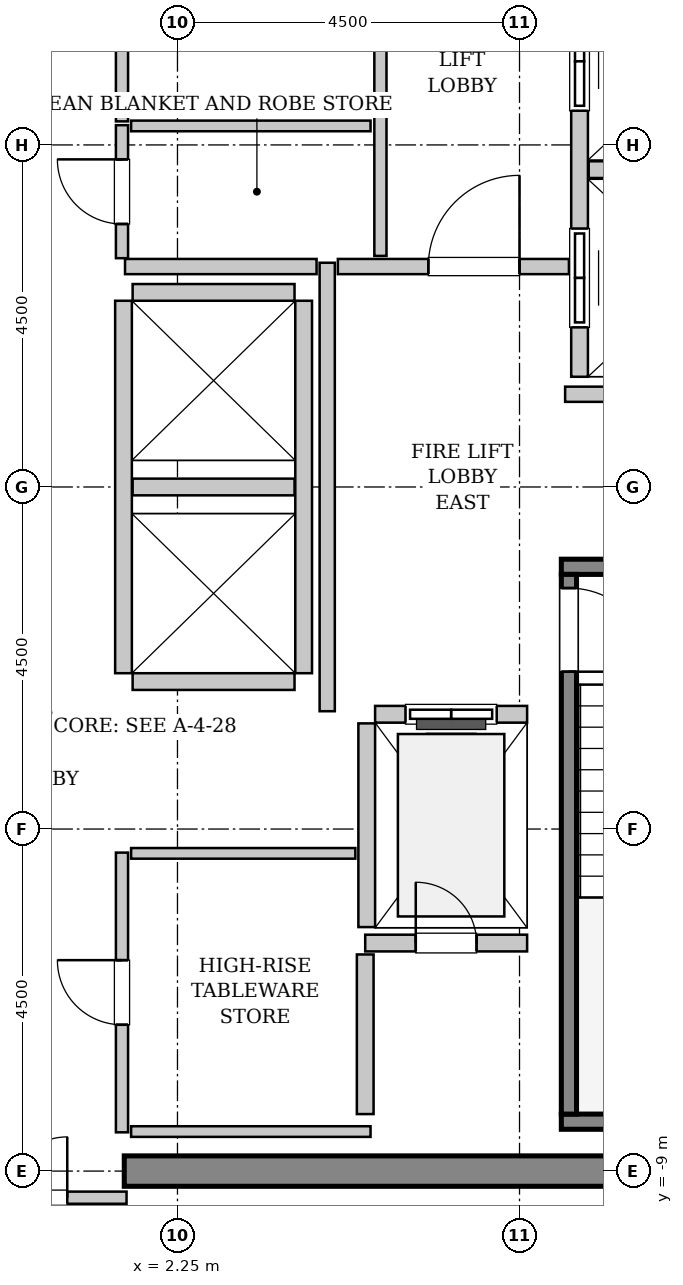
"""IFC4 building model, lengths in metres.
Left out: names, types, materials, properties, quantities, classifications, styles, units other than length and angle.
Written with IfcOpenShell. Run it as: python <this file> out.ifc"""

import sys

from ifc_helpers import new_model, si_unit, direction, frame, frame_2d, origin, place, context, subcontext, project, spatial, rectangle, extrude, source, transform, mapped, element, fill, save


model = new_model("IFC4")
c1 = context("Model", 3, precision=1e-05, world=origin(), true_north=direction((0.0, 1.0)))
c2 = subcontext(c1, "Body", "Model", "MODEL_VIEW")
j1 = project(units=[si_unit("LENGTHUNIT", "METRE"), si_unit("PLANEANGLEUNIT", "RADIAN")], contexts=[c1])
p1 = place(None, origin())
s1 = spatial("IfcSite", under=j1, at=p1, CompositionType="ELEMENT")
p2 = place(p1, origin())
s2 = spatial("IfcBuilding", under=s1, at=p2, CompositionType="ELEMENT")
p3 = place(p2, frame((0.0, 0.0, 345.2)))
s3 = spatial("IfcBuildingStorey", under=s2, at=p3, CompositionType="ELEMENT", Elevation=345.2)
m1 = source(origin(), c2, "Body", "SweptSolid", [
    extrude(rectangle(XDim=9.9, YDim=0.4, at=frame_2d((4.95, 0.0))), origin(), (0.0, 0.0, 1.0), 3.8),
])
p4 = place(p3, frame((1.55, -9.0, 0.0), z_axis=(0.0, 0.0, 1.0), x_axis=(1.0, 0.0, 0.0)))
e1 = element("IfcWall", 1, at=p4, inside=s3, PredefinedType="SHEAR", context=c2, shape_type="MappedRepresentation", body=[
    mapped(m1, transform((0.0, 0.0, 0.0), x_axis=(1.0, 0.0, 0.0), y_axis=(0.0, 1.0, 0.0), z_axis=(0.0, 0.0, 1.0), scale=1.0)),
])
m2 = source(origin(), c2, "Body", "SweptSolid", [
    extrude(rectangle(XDim=3.4, YDim=0.2, at=frame_2d((1.7, 0.0))), origin(), (0.0, 0.0, 1.0), 3.8),
])
p5 = place(p3, frame((7.3, -1.05, 0.0), z_axis=(0.0, 0.0, 1.0), x_axis=(1.0, 0.0, 0.0)))
e2 = element("IfcWall", 2, at=p5, inside=s3, PredefinedType="SOLIDWALL", context=c2, shape_type="MappedRepresentation", body=[
    mapped(m2, transform((0.0, 0.0, 0.0), x_axis=(1.0, 0.0, 0.0), y_axis=(0.0, 1.0, 0.0), z_axis=(0.0, 0.0, 1.0), scale=1.0)),
])
m3 = source(origin(), c2, "Body", "SweptSolid", [
    extrude(rectangle(XDim=3.755, YDim=0.2, at=frame_2d((1.877, 0.0))), origin(), (0.0, 0.0, 1.0), 3.8),
])
p6 = place(p3, frame((7.3, -8.35, 0.0), z_axis=(0.0, 0.0, 1.0), x_axis=(1.0, 0.0, 0.0)))
e3 = element("IfcWall", 3, at=p6, inside=s3, PredefinedType="SOLIDWALL", context=c2, shape_type="MappedRepresentation", body=[
    mapped(m3, transform((0.0, 0.0, 0.0), x_axis=(1.0, 0.0, 0.0), y_axis=(0.0, 1.0, 0.0), z_axis=(0.0, 0.0, 1.0), scale=1.0)),
])
m4 = source(origin(), c2, "Body", "SweptSolid", [
    extrude(rectangle(XDim=7.1, YDim=0.2, at=frame_2d((3.55, 0.0))), origin(), (0.0, 0.0, 1.0), 3.8),
])
p7 = place(p3, frame((7.4, -1.15, 0.0), z_axis=(0.0, 0.0, 1.0), x_axis=(0.0, -1.0, 0.0)))
e4 = element("IfcWall", 4, at=p7, inside=s3, PredefinedType="SOLIDWALL", context=c2, shape_type="MappedRepresentation", body=[
    mapped(m4, transform((0.0, 0.0, 0.0), x_axis=(1.0, 0.0, 0.0), y_axis=(0.0, 1.0, 0.0), z_axis=(0.0, 0.0, 1.0), scale=1.0)),
])
p8 = place(p7, frame((0.18, 0.0, 0.0)))
e5 = element("IfcOpeningElement", 5, at=p8, cuts=e4, PredefinedType="OPENING", context=c2, shape_type="SweptSolid", body=[
    extrude(rectangle(XDim=1.1, YDim=2.15, at=frame_2d((0.55, 1.075))), frame((0.0, 0.11, 0.0), z_axis=(0.0, -1.0, 0.0), x_axis=(1.0, 0.0, 0.0)), (0.0, 0.0, 1.0), 0.22),
])
m5 = source(origin(), c2, "Body", "SweptSolid", [
    extrude(rectangle(XDim=2.0, YDim=0.22, at=frame_2d((1.0, 0.0))), origin(), (0.0, 0.0, 1.0), 3.485),
])
p9 = place(p3, frame((6.85, -2.99, 0.0), z_axis=(0.0, 0.0, 1.0), x_axis=(-1.0, 0.0, 0.0)))
e6 = element("IfcWall", 6, at=p9, inside=s3, PredefinedType="SOLIDWALL", context=c2, shape_type="MappedRepresentation", body=[
    mapped(m5, transform((0.0, 0.0, 0.0), x_axis=(1.0, 0.0, 0.0), y_axis=(0.0, 1.0, 0.0), z_axis=(0.0, 0.0, 1.0), scale=1.0)),
])
p10 = place(p9, frame((0.4, 0.0, 0.0)))
e7 = element("IfcOpeningElement", 7, at=p10, cuts=e6, PredefinedType="OPENING", context=c2, shape_type="SweptSolid", body=[
    extrude(rectangle(XDim=1.2, YDim=2.2, at=frame_2d((0.6, 1.1))), frame((0.0, 0.12, 0.0), z_axis=(0.0, -1.0, 0.0), x_axis=(1.0, 0.0, 0.0)), (0.0, 0.0, 1.0), 0.24),
])
m6 = source(origin(), c2, "Body", "SweptSolid", [
    extrude(rectangle(XDim=2.68, YDim=0.22, at=frame_2d((1.34, 0.0))), origin(), (0.0, 0.0, 1.0), 3.485),
])
p11 = place(p3, frame((4.74, -3.11, 0.0), z_axis=(0.0, 0.0, 1.0), x_axis=(0.0, -1.0, 0.0)))
e8 = element("IfcWall", 8, at=p11, inside=s3, PredefinedType="SOLIDWALL", context=c2, shape_type="MappedRepresentation", body=[
    mapped(m6, transform((0.0, 0.0, 0.0), x_axis=(1.0, 0.0, 0.0), y_axis=(0.0, 1.0, 0.0), z_axis=(0.0, 0.0, 1.0), scale=1.0)),
])
m7 = source(origin(), c2, "Body", "SweptSolid", [
    extrude(rectangle(XDim=5.45, YDim=0.22, at=frame_2d((2.725, 0.0))), origin(), (0.0, 0.0, 1.0), 3.485),
])
p12 = place(p3, frame((7.54, 6.9, 0.0), z_axis=(0.0, 0.0, 1.0), x_axis=(0.0, -1.0, 0.0)))
e9 = element("IfcWall", 9, at=p12, inside=s3, PredefinedType="SOLIDWALL", context=c2, shape_type="MappedRepresentation", body=[
    mapped(m7, transform((0.0, 0.0, 0.0), x_axis=(1.0, 0.0, 0.0), y_axis=(0.0, 1.0, 0.0), z_axis=(0.0, 0.0, 1.0), scale=1.0)),
])
p13 = place(p12, frame((3.5, 0.0, 0.0)))
e10 = element("IfcOpeningElement", 10, at=p13, cuts=e9, PredefinedType="OPENING", context=c2, shape_type="SweptSolid", body=[
    extrude(rectangle(XDim=1.3, YDim=2.3, at=frame_2d((0.65, 1.15))), frame((0.0, 0.12, 0.0), z_axis=(0.0, -1.0, 0.0), x_axis=(1.0, 0.0, 0.0)), (0.0, 0.0, 1.0), 0.24),
])
p14 = place(p12, frame((0.65, 0.0, 0.0)))
e11 = element("IfcOpeningElement", 11, at=p14, cuts=e9, PredefinedType="OPENING", context=c2, shape_type="SweptSolid", body=[
    extrude(rectangle(XDim=1.3, YDim=2.3, at=frame_2d((0.65, 1.15))), frame((0.0, 0.12, 0.0), z_axis=(0.0, -1.0, 0.0), x_axis=(1.0, 0.0, 0.0)), (0.0, 0.0, 1.0), 0.24),
])
m8 = source(origin(), c2, "Body", "SweptSolid", [
    extrude(rectangle(XDim=2.78, YDim=0.22, at=frame_2d((1.39, 0.0))), origin(), (0.0, 0.0, 1.0), 3.485),
])
p15 = place(p3, frame((7.66, 4.175, 0.0), z_axis=(0.0, 0.0, 1.0), x_axis=(1.0, 0.0, 0.0)))
e12 = element("IfcWall", 12, at=p15, inside=s3, PredefinedType="SOLIDWALL", context=c2, shape_type="MappedRepresentation", body=[
    mapped(m8, transform((0.0, 0.0, 0.0), x_axis=(1.0, 0.0, 0.0), y_axis=(0.0, 1.0, 0.0), z_axis=(0.0, 0.0, 1.0), scale=1.0)),
])
m9 = source(origin(), c2, "Body", "SweptSolid", [
    extrude(rectangle(XDim=4.9, YDim=0.22, at=frame_2d((2.45, 0.0))), origin(), (0.0, 0.0, 1.0), 3.485),
])
for number, where, z_axis, x_axis in (
    (13, (1.54, 2.45, 0.0), (0.0, 0.0, 1.0), (0.0, -1.0, 0.0)),
    (14, (3.91, -2.45, 0.0), (0.0, 0.0, 1.0), (0.0, 1.0, 0.0)),
):
    element("IfcWall", number, at=place(p3, frame(where, z_axis=z_axis, x_axis=x_axis)), inside=s3, PredefinedType="SOLIDWALL", context=c2, shape_type="MappedRepresentation", body=[
        mapped(m9, transform((0.0, 0.0, 0.0), x_axis=(1.0, 0.0, 0.0), y_axis=(0.0, 1.0, 0.0), z_axis=(0.0, 0.0, 1.0), scale=1.0)),
    ])
m10 = source(origin(), c2, "Body", "SweptSolid", [
    extrude(rectangle(XDim=2.13, YDim=0.22, at=frame_2d((1.065, 0.0))), origin(), (0.0, 0.0, 1.0), 3.485),
])
for number, where, z_axis, x_axis in (
    (15, (1.66, -2.56, 0.0), (0.0, 0.0, 1.0), (1.0, 0.0, 0.0)),
    (16, (1.66, 0.0, 0.0), (0.0, 0.0, 1.0), (1.0, 0.0, 0.0)),
    (17, (3.79, 2.56, 0.0), (0.0, 0.0, 1.0), (-1.0, 0.0, 0.0)),
):
    element("IfcWall", number, at=place(p3, frame(where, z_axis=z_axis, x_axis=x_axis)), inside=s3, PredefinedType="SOLIDWALL", context=c2, shape_type="MappedRepresentation", body=[
        mapped(m10, transform((0.0, 0.0, 0.0), x_axis=(1.0, 0.0, 0.0), y_axis=(0.0, 1.0, 0.0), z_axis=(0.0, 0.0, 1.0), scale=1.0)),
    ])
p16 = place(p3, frame((4.72, -6.0, 0.0), z_axis=(0.0, 0.0, 1.0), x_axis=(1.0, 0.0, 0.0)))
e18 = element("IfcWall", 18, at=p16, inside=s3, PredefinedType="SOLIDWALL", context=c2, shape_type="MappedRepresentation", body=[
    mapped(m10, transform((0.0, 0.0, 0.0), x_axis=(1.0, 0.0, 0.0), y_axis=(0.0, 1.0, 0.0), z_axis=(0.0, 0.0, 1.0), scale=1.0)),
])
p17 = place(p16, frame((0.665, 0.0, 0.0)))
e19 = element("IfcOpeningElement", 19, at=p17, cuts=e18, PredefinedType="OPENING", context=c2, shape_type="SweptSolid", body=[
    extrude(rectangle(XDim=0.8, YDim=2.0, at=frame_2d((0.4, 1.0))), frame((0.0, 0.12, 0.0), z_axis=(0.0, -1.0, 0.0), x_axis=(1.0, 0.0, 0.0)), (0.0, 0.0, 1.0), 0.24),
])
m11 = source(origin(), c2, "Body", "SweptSolid", [
    extrude(rectangle(XDim=2.1, YDim=0.22, at=frame_2d((1.05, 0.0))), origin(), (0.0, 0.0, 1.0), 3.485),
])
p18 = place(p3, frame((4.72, -8.25, 0.0), z_axis=(0.0, 0.0, 1.0), x_axis=(0.0, 1.0, 0.0)))
e20 = element("IfcWall", 20, at=p18, inside=s3, PredefinedType="SOLIDWALL", context=c2, shape_type="MappedRepresentation", body=[
    mapped(m11, transform((0.0, 0.0, 0.0), x_axis=(1.0, 0.0, 0.0), y_axis=(0.0, 1.0, 0.0), z_axis=(0.0, 0.0, 1.0), scale=1.0)),
])
m12 = source(origin(), c2, "Body", "SweptSolid", [
    extrude(rectangle(XDim=5.9, YDim=0.2, at=frame_2d((2.95, 0.0))), origin(), (0.0, 0.0, 1.0), 3.485),
])
p19 = place(p3, frame((4.22, -2.95, 0.0), z_axis=(0.0, 0.0, 1.0), x_axis=(0.0, 1.0, 0.0)))
e21 = element("IfcWall", 21, at=p19, inside=s3, PredefinedType="PARTITIONING", context=c2, shape_type="MappedRepresentation", body=[
    mapped(m12, transform((0.0, 0.0, 0.0), x_axis=(1.0, 0.0, 0.0), y_axis=(0.0, 1.0, 0.0), z_axis=(0.0, 0.0, 1.0), scale=1.0)),
])
m13 = source(origin(), c2, "Body", "SweptSolid", [
    extrude(rectangle(XDim=2.52, YDim=0.2, at=frame_2d((1.26, 0.0))), origin(), (0.0, 0.0, 1.0), 3.485),
])
p20 = place(p3, frame((1.56, 2.9, 0.0), z_axis=(0.0, 0.0, 1.0), x_axis=(1.0, 0.0, 0.0)))
e22 = element("IfcWall", 22, at=p20, inside=s3, PredefinedType="PARTITIONING", context=c2, shape_type="MappedRepresentation", body=[
    mapped(m13, transform((0.0, 0.0, 0.0), x_axis=(1.0, 0.0, 0.0), y_axis=(0.0, 1.0, 0.0), z_axis=(0.0, 0.0, 1.0), scale=1.0)),
])
m14 = source(origin(), c2, "Body", "SweptSolid", [
    extrude(rectangle(XDim=3.04, YDim=0.2, at=frame_2d((1.52, 0.0))), origin(), (0.0, 0.0, 1.0), 3.485),
])
p21 = place(p3, frame((4.36, 2.9, 0.0), z_axis=(0.0, 0.0, 1.0), x_axis=(1.0, 0.0, 0.0)))
e23 = element("IfcWall", 23, at=p21, inside=s3, PredefinedType="PARTITIONING", context=c2, shape_type="MappedRepresentation", body=[
    mapped(m14, transform((0.0, 0.0, 0.0), x_axis=(1.0, 0.0, 0.0), y_axis=(0.0, 1.0, 0.0), z_axis=(0.0, 0.0, 1.0), scale=1.0)),
])
p22 = place(p21, frame((1.19, 0.0, 0.0)))
e24 = element("IfcOpeningElement", 24, at=p22, cuts=e23, PredefinedType="OPENING", context=c2, shape_type="SweptSolid", body=[
    extrude(rectangle(XDim=1.2, YDim=2.15, at=frame_2d((0.6, 1.075))), frame((0.0, 0.11, 0.0), z_axis=(0.0, -1.0, 0.0), x_axis=(1.0, 0.0, 0.0)), (0.0, 0.0, 1.0), 0.22),
])
m15 = source(origin(), c2, "Body", "SweptSolid", [
    extrude(rectangle(XDim=4.11, YDim=0.2, at=frame_2d((2.055, 0.0))), origin(), (0.0, 0.0, 1.0), 3.485),
])
p23 = place(p3, frame((7.35, 1.22, 0.0), z_axis=(0.0, 0.0, 1.0), x_axis=(1.0, 0.0, 0.0)))
e25 = element("IfcWall", 25, at=p23, inside=s3, PredefinedType="PARTITIONING", context=c2, shape_type="MappedRepresentation", body=[
    mapped(m15, transform((0.0, 0.0, 0.0), x_axis=(1.0, 0.0, 0.0), y_axis=(0.0, 1.0, 0.0), z_axis=(0.0, 0.0, 1.0), scale=1.0)),
])
m16 = source(origin(), c2, "Body", "SweptSolid", [
    extrude(rectangle(XDim=3.16, YDim=0.16, at=frame_2d((1.58, 0.0))), origin(), (0.0, 0.0, 1.0), 2.575),
])
p24 = place(p3, frame((-1.58, -9.35, 0.0), z_axis=(0.0, 0.0, 1.0), x_axis=(1.0, 0.0, 0.0)))
e26 = element("IfcWall", 26, at=p24, inside=s3, PredefinedType="PARTITIONING", context=c2, shape_type="MappedRepresentation", body=[
    mapped(m16, transform((0.0, 0.0, 0.0), x_axis=(1.0, 0.0, 0.0), y_axis=(0.0, 1.0, 0.0), z_axis=(0.0, 0.0, 1.0), scale=1.0)),
])
p25 = place(p24, frame((0.78, 0.0, 0.0)))
e27 = element("IfcOpeningElement", 27, at=p25, cuts=e26, PredefinedType="OPENING", context=c2, shape_type="SweptSolid", body=[
    extrude(rectangle(XDim=1.6, YDim=2.3, at=frame_2d((0.8, 1.15))), frame((0.0, 0.09, 0.0), z_axis=(0.0, -1.0, 0.0), x_axis=(1.0, 0.0, 0.0)), (0.0, 0.0, 1.0), 0.18),
])
m17 = source(origin(), c2, "Body", "SweptSolid", [
    extrude(rectangle(XDim=5.45, YDim=0.16, at=frame_2d((2.725, 0.0))), origin(), (0.0, 0.0, 1.0), 3.485),
])
p26 = place(p3, frame((4.92, 3.04, 0.0), z_axis=(0.0, 0.0, 1.0), x_axis=(0.0, 1.0, 0.0)))
e28 = element("IfcWall", 28, at=p26, inside=s3, PredefinedType="PARTITIONING", context=c2, shape_type="MappedRepresentation", body=[
    mapped(m17, transform((0.0, 0.0, 0.0), x_axis=(1.0, 0.0, 0.0), y_axis=(0.0, 1.0, 0.0), z_axis=(0.0, 0.0, 1.0), scale=1.0)),
])
m18 = source(origin(), c2, "Body", "SweptSolid", [
    extrude(rectangle(XDim=1.75, YDim=0.16, at=frame_2d((0.875, 0.0))), origin(), (0.0, 0.0, 1.0), 3.485),
])
p27 = place(p3, frame((1.52, 3.01, 0.0), z_axis=(0.0, 0.0, 1.0), x_axis=(0.0, 1.0, 0.0)))
e29 = element("IfcWall", 29, at=p27, inside=s3, PredefinedType="PARTITIONING", context=c2, shape_type="MappedRepresentation", body=[
    mapped(m18, transform((0.0, 0.0, 0.0), x_axis=(1.0, 0.0, 0.0), y_axis=(0.0, 1.0, 0.0), z_axis=(0.0, 0.0, 1.0), scale=1.0)),
])
p28 = place(p27, frame((0.45, 0.0, 0.0)))
e30 = element("IfcOpeningElement", 30, at=p28, cuts=e29, PredefinedType="OPENING", context=c2, shape_type="SweptSolid", body=[
    extrude(rectangle(XDim=0.85, YDim=2.1, at=frame_2d((0.425, 1.05))), frame((0.0, 0.09, 0.0), z_axis=(0.0, -1.0, 0.0), x_axis=(1.0, 0.0, 0.0)), (0.0, 0.0, 1.0), 0.18),
])
m19 = source(origin(), c2, "Body", "SweptSolid", [
    extrude(rectangle(XDim=3.15, YDim=0.14, at=frame_2d((1.575, 0.0))), origin(), (0.0, 0.0, 1.0), 3.485),
])
p29 = place(p3, frame((1.64, 4.75, 0.0), z_axis=(0.0, 0.0, 1.0), x_axis=(1.0, 0.0, 0.0)))
e31 = element("IfcWall", 31, at=p29, inside=s3, PredefinedType="PARTITIONING", context=c2, shape_type="MappedRepresentation", body=[
    mapped(m19, transform((0.0, 0.0, 0.0), x_axis=(1.0, 0.0, 0.0), y_axis=(0.0, 1.0, 0.0), z_axis=(0.0, 0.0, 1.0), scale=1.0)),
])
m20 = source(origin(), c2, "Body", "SweptSolid", [
    extrude(rectangle(XDim=3.68, YDim=0.16, at=frame_2d((1.84, 0.0))), origin(), (0.0, 0.0, 1.0), 3.485),
])
p30 = place(p3, frame((1.52, 4.81, 0.0), z_axis=(0.0, 0.0, 1.0), x_axis=(0.0, 1.0, 0.0)))
e32 = element("IfcWall", 32, at=p30, inside=s3, PredefinedType="PARTITIONING", context=c2, shape_type="MappedRepresentation", body=[
    mapped(m20, transform((0.0, 0.0, 0.0), x_axis=(1.0, 0.0, 0.0), y_axis=(0.0, 1.0, 0.0), z_axis=(0.0, 0.0, 1.0), scale=1.0)),
])
p31 = place(p30, frame((1.415, 0.0, 0.0)))
e33 = element("IfcOpeningElement", 33, at=p31, cuts=e32, PredefinedType="OPENING", context=c2, shape_type="SweptSolid", body=[
    extrude(rectangle(XDim=0.85, YDim=2.1, at=frame_2d((0.425, 1.05))), frame((0.0, 0.09, 0.0), z_axis=(0.0, -1.0, 0.0), x_axis=(1.0, 0.0, 0.0)), (0.0, 0.0, 1.0), 0.18),
])
p32 = place(p3, frame((1.52, -8.49, 0.0), z_axis=(0.0, 0.0, 1.0), x_axis=(0.0, 1.0, 0.0)))
e34 = element("IfcWall", 34, at=p32, inside=s3, PredefinedType="PARTITIONING", context=c2, shape_type="MappedRepresentation", body=[
    mapped(m20, transform((0.0, 0.0, 0.0), x_axis=(1.0, 0.0, 0.0), y_axis=(0.0, 1.0, 0.0), z_axis=(0.0, 0.0, 1.0), scale=1.0)),
])
p33 = place(p32, frame((1.415, 0.0, 0.0)))
e35 = element("IfcOpeningElement", 35, at=p33, cuts=e34, PredefinedType="OPENING", context=c2, shape_type="SweptSolid", body=[
    extrude(rectangle(XDim=0.85, YDim=2.1, at=frame_2d((0.425, 1.05))), frame((0.0, 0.09, 0.0), z_axis=(0.0, -1.0, 0.0), x_axis=(1.0, 0.0, 0.0)), (0.0, 0.0, 1.0), 0.18),
])
m21 = source(origin(), c2, "Body", "SweptSolid", [
    extrude(rectangle(XDim=2.95, YDim=0.14, at=frame_2d((1.475, 0.0))), origin(), (0.0, 0.0, 1.0), 3.485),
])
p34 = place(p3, frame((1.64, -4.82, 0.0), z_axis=(0.0, 0.0, 1.0), x_axis=(1.0, 0.0, 0.0)))
e36 = element("IfcWall", 36, at=p34, inside=s3, PredefinedType="PARTITIONING", context=c2, shape_type="MappedRepresentation", body=[
    mapped(m21, transform((0.0, 0.0, 0.0), x_axis=(1.0, 0.0, 0.0), y_axis=(0.0, 1.0, 0.0), z_axis=(0.0, 0.0, 1.0), scale=1.0)),
])
p35 = place(p3, frame((1.64, -8.48, 0.0), z_axis=(0.0, 0.0, 1.0), x_axis=(1.0, 0.0, 0.0)))
e37 = element("IfcWall", 37, at=p35, inside=s3, PredefinedType="PARTITIONING", context=c2, shape_type="MappedRepresentation", body=[
    mapped(m19, transform((0.0, 0.0, 0.0), x_axis=(1.0, 0.0, 0.0), y_axis=(0.0, 1.0, 0.0), z_axis=(0.0, 0.0, 1.0), scale=1.0)),
])
m22 = source(origin(), c2, "Body", "SweptSolid", [
    extrude(rectangle(XDim=1.1, YDim=2.15, at=frame_2d((0.55, 1.075))), frame((0.0, 0.025, 0.0), z_axis=(0.0, -1.0, 0.0), x_axis=(1.0, 0.0, 0.0)), (0.0, 0.0, 1.0), 0.05),
])
p36 = place(p8, origin())
e38 = element("IfcDoor", 38, at=p36, inside=s3, OperationType="SINGLE_SWING_RIGHT", PredefinedType="DOOR", context=c2, shape_type="MappedRepresentation", body=[
    mapped(m22, transform((0.0, 0.0, 0.0), x_axis=(1.0, 0.0, 0.0), y_axis=(0.0, 1.0, 0.0), z_axis=(0.0, 0.0, 1.0), scale=1.0)),
])
fill(e5, e38)
m23 = source(origin(), c2, "Body", "SweptSolid", [
    extrude(rectangle(XDim=1.2, YDim=2.2, at=frame_2d((0.6, 1.1))), frame((0.0, 0.025, 0.0), z_axis=(0.0, -1.0, 0.0), x_axis=(1.0, 0.0, 0.0)), (0.0, 0.0, 1.0), 0.05),
])
p37 = place(p10, origin())
e39 = element("IfcDoor", 39, at=p37, inside=s3, OperationType="SLIDING_TO_LEFT", PredefinedType="DOOR", context=c2, shape_type="MappedRepresentation", body=[
    mapped(m23, transform((0.0, 0.0, 0.0), x_axis=(1.0, 0.0, 0.0), y_axis=(0.0, 1.0, 0.0), z_axis=(0.0, 0.0, 1.0), scale=1.0)),
])
fill(e7, e39)
m24 = source(origin(), c2, "Body", "SweptSolid", [
    extrude(rectangle(XDim=1.3, YDim=2.3, at=frame_2d((0.65, 1.15))), frame((0.0, 0.025, 0.0), z_axis=(0.0, -1.0, 0.0), x_axis=(1.0, 0.0, 0.0)), (0.0, 0.0, 1.0), 0.05),
])
p38 = place(p13, origin())
e40 = element("IfcDoor", 40, at=p38, inside=s3, OperationType="SLIDING_TO_RIGHT", PredefinedType="DOOR", context=c2, shape_type="MappedRepresentation", body=[
    mapped(m24, transform((0.0, 0.0, 0.0), x_axis=(1.0, 0.0, 0.0), y_axis=(0.0, 1.0, 0.0), z_axis=(0.0, 0.0, 1.0), scale=1.0)),
])
fill(e10, e40)
p39 = place(p14, origin())
e41 = element("IfcDoor", 41, at=p39, inside=s3, OperationType="SLIDING_TO_RIGHT", PredefinedType="DOOR", context=c2, shape_type="MappedRepresentation", body=[
    mapped(m24, transform((0.0, 0.0, 0.0), x_axis=(1.0, 0.0, 0.0), y_axis=(0.0, 1.0, 0.0), z_axis=(0.0, 0.0, 1.0), scale=1.0)),
])
fill(e11, e41)
m25 = source(origin(), c2, "Body", "SweptSolid", [
    extrude(rectangle(XDim=0.8, YDim=2.0, at=frame_2d((0.4, 1.0))), frame((0.0, 0.025, 0.0), z_axis=(0.0, -1.0, 0.0), x_axis=(1.0, 0.0, 0.0)), (0.0, 0.0, 1.0), 0.05),
])
p40 = place(p17, origin())
e42 = element("IfcDoor", 42, at=p40, inside=s3, OperationType="SINGLE_SWING_LEFT", PredefinedType="TRAPDOOR", context=c2, shape_type="MappedRepresentation", body=[
    mapped(m25, transform((0.0, 0.0, 0.0), x_axis=(1.0, 0.0, 0.0), y_axis=(0.0, 1.0, 0.0), z_axis=(0.0, 0.0, 1.0), scale=1.0)),
])
fill(e19, e42)
m26 = source(origin(), c2, "Body", "SweptSolid", [
    extrude(rectangle(XDim=1.2, YDim=2.15, at=frame_2d((0.6, 1.075))), frame((0.0, 0.025, 0.0), z_axis=(0.0, -1.0, 0.0), x_axis=(1.0, 0.0, 0.0)), (0.0, 0.0, 1.0), 0.05),
])
p41 = place(p22, origin())
e43 = element("IfcDoor", 43, at=p41, inside=s3, OperationType="SINGLE_SWING_RIGHT", PredefinedType="DOOR", context=c2, shape_type="MappedRepresentation", body=[
    mapped(m26, transform((0.0, 0.0, 0.0), x_axis=(1.0, 0.0, 0.0), y_axis=(0.0, 1.0, 0.0), z_axis=(0.0, 0.0, 1.0), scale=1.0)),
])
fill(e24, e43)
m27 = source(origin(), c2, "Body", "SweptSolid", [
    extrude(rectangle(XDim=1.6, YDim=2.3, at=frame_2d((0.8, 1.15))), frame((0.0, 0.025, 0.0), z_axis=(0.0, -1.0, 0.0), x_axis=(1.0, 0.0, 0.0)), (0.0, 0.0, 1.0), 0.05),
])
p42 = place(p25, origin())
e44 = element("IfcDoor", 44, at=p42, inside=s3, OperationType="DOUBLE_DOOR_SINGLE_SWING", PredefinedType="DOOR", context=c2, shape_type="MappedRepresentation", body=[
    mapped(m27, transform((0.0, 0.0, 0.0), x_axis=(1.0, 0.0, 0.0), y_axis=(0.0, 1.0, 0.0), z_axis=(0.0, 0.0, 1.0), scale=1.0)),
])
fill(e27, e44)
m28 = source(origin(), c2, "Body", "SweptSolid", [
    extrude(rectangle(XDim=0.85, YDim=2.1, at=frame_2d((0.425, 1.05))), frame((0.0, 0.025, 0.0), z_axis=(0.0, -1.0, 0.0), x_axis=(1.0, 0.0, 0.0)), (0.0, 0.0, 1.0), 0.05),
])
p43 = place(p28, origin())
e45 = element("IfcDoor", 45, at=p43, inside=s3, OperationType="SINGLE_SWING_RIGHT", PredefinedType="DOOR", context=c2, shape_type="MappedRepresentation", body=[
    mapped(m28, transform((0.0, 0.0, 0.0), x_axis=(1.0, 0.0, 0.0), y_axis=(0.0, 1.0, 0.0), z_axis=(0.0, 0.0, 1.0), scale=1.0)),
])
fill(e30, e45)
p44 = place(p33, origin())
e46 = element("IfcDoor", 46, at=p44, inside=s3, OperationType="SINGLE_SWING_RIGHT", PredefinedType="DOOR", context=c2, shape_type="MappedRepresentation", body=[
    mapped(m28, transform((0.0, 0.0, 0.0), x_axis=(1.0, 0.0, 0.0), y_axis=(0.0, 1.0, 0.0), z_axis=(0.0, 0.0, 1.0), scale=1.0)),
])
fill(e35, e46)
save(model, sys.argv[1])
